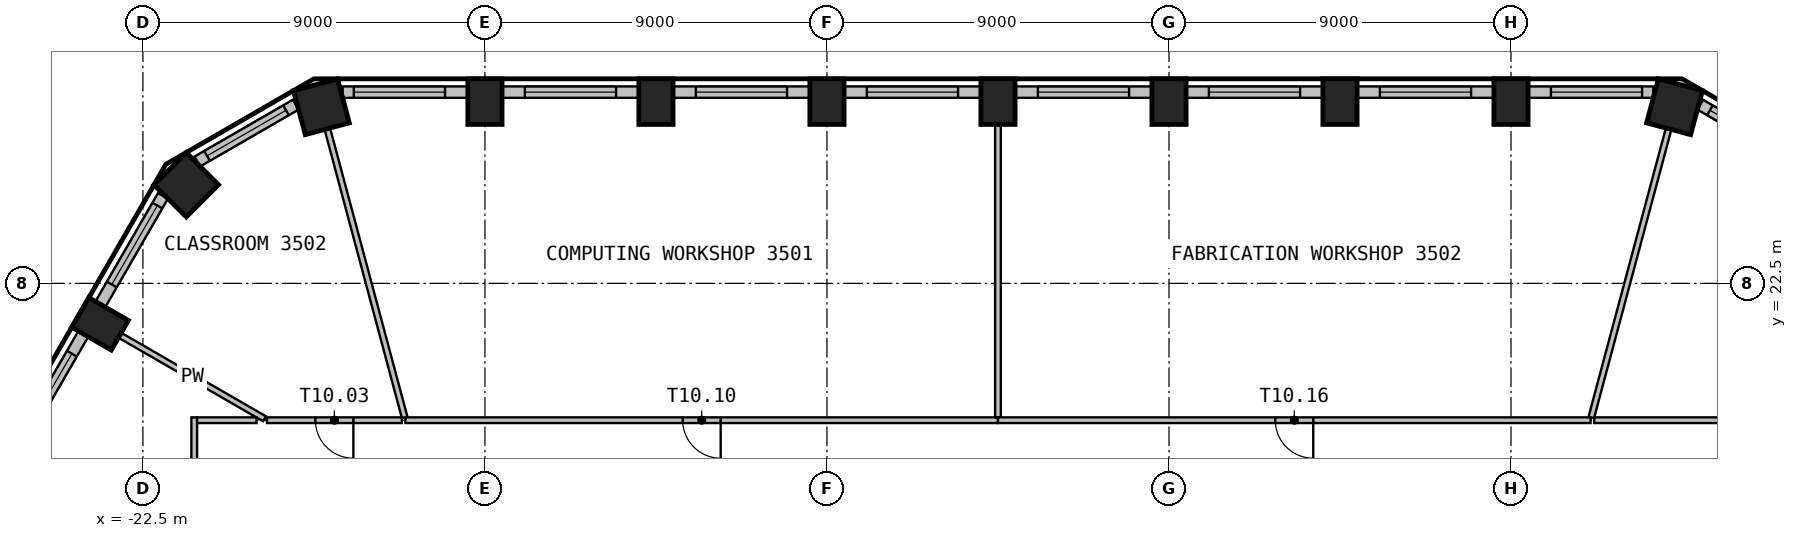
"""IFC4 building model, lengths in metres.
Left out: names, types, materials, properties, quantities, classifications, styles, units other than length and angle.
Written with IfcOpenShell. Run it as: python <this file> out.ifc"""

import sys

from ifc_helpers import new_model, si_unit, direction, frame, frame_2d, origin, origin_2d, place, context, subcontext, project, spatial, rectangle, extrude, element, fill, save


model = new_model("IFC4")
c1 = context("Model", 3, precision=1e-05, world=origin(), true_north=direction((0.0, 1.0)))
c2 = subcontext(c1, "Body", "Model", "MODEL_VIEW")
j1 = project(units=[si_unit("LENGTHUNIT", "METRE"), si_unit("PLANEANGLEUNIT", "RADIAN")], contexts=[c1])
p1 = place(None, origin())
s1 = spatial("IfcSite", under=j1, at=p1, CompositionType="ELEMENT")
p2 = place(p1, origin())
s2 = spatial("IfcBuilding", under=s1, at=p2, CompositionType="ELEMENT")
p3 = place(p2, frame((0.0, 0.0, 144.3)))
s3 = spatial("IfcBuildingStorey", under=s2, at=p3, CompositionType="ELEMENT", Elevation=144.3)
p4 = place(p3, frame((17.803, 27.148, 0.0), z_axis=(0.0, 0.0, 1.0), x_axis=(-0.965925826289, 0.258819045103, 0.0)))
e1 = element("IfcColumn", 1, at=p4, inside=s3, PredefinedType="COLUMN", context=c2, shape_type="SweptSolid", body=[
    extrude(rectangle(XDim=1.2, YDim=1.2, at=origin_2d()), origin(), (0.0, 0.0, 1.0), 3.575),
])
for number, where, z_axis, x_axis in (
    (2, (13.5, 27.283, 0.0), (0.0, 0.0, 1.0), (-1.0, 0.0, 0.0)),
    (3, (9.0, 27.283, 0.0), (0.0, 0.0, 1.0), (-1.0, 0.0, 0.0)),
    (4, (4.5, 27.283, 0.0), (0.0, 0.0, 1.0), (-1.0, 0.0, 0.0)),
    (5, (0.0, 27.283, 0.0), (0.0, 0.0, 1.0), (-1.0, 0.0, 0.0)),
    (6, (-4.5, 27.283, 0.0), (0.0, 0.0, 1.0), (-1.0, 0.0, 0.0)),
    (7, (-9.0, 27.283, 0.0), (0.0, 0.0, 1.0), (-1.0, 0.0, 0.0)),
    (8, (-13.5, 27.283, 0.0), (0.0, 0.0, 1.0), (-1.0, 0.0, 0.0)),
):
    element("IfcColumn", number, at=place(p3, frame(where, z_axis=z_axis, x_axis=x_axis)), inside=s3, PredefinedType="COLUMN", context=c2, shape_type="SweptSolid", body=[
        extrude(rectangle(XDim=0.9, YDim=1.2, at=origin_2d()), origin(), (0.0, 0.0, 1.0), 3.575),
    ])
for number, where, z_axis, x_axis in (
    (9, (-17.803, 27.148, 0.0), (0.0, 0.0, 1.0), (-0.966, -0.259, 0.0)),
    (10, (-21.359, 25.095, 0.0), (0.0, 0.0, 1.0), (-0.707, -0.707, 0.0)),
):
    element("IfcColumn", number, at=place(p3, frame(where, z_axis=z_axis, x_axis=x_axis)), inside=s3, PredefinedType="COLUMN", context=c2, shape_type="SweptSolid", body=[
        extrude(rectangle(XDim=1.2, YDim=1.2, at=origin_2d()), origin(), (0.0, 0.0, 1.0), 3.575),
    ])
p5 = place(p3, frame((-23.627, 21.436, 0.0), z_axis=(0.0, 0.0, 1.0), x_axis=(-0.5, -0.866025403784, 0.0)))
e11 = element("IfcColumn", 11, at=p5, inside=s3, PredefinedType="COLUMN", context=c2, shape_type="SweptSolid", body=[
    extrude(rectangle(XDim=0.9, YDim=1.2, at=origin_2d()), origin(), (0.0, 0.0, 1.0), 3.575),
])
p6 = place(p3, frame((21.068, 25.707, 0.0), z_axis=(0.0, 0.0, 1.0), x_axis=(-0.866012844897, 0.500021752, 0.0)))
e12 = element("IfcWall", 12, at=p6, inside=s3, PredefinedType="SOLIDWALL", context=c2, shape_type="SweptSolid", body=[
    extrude(rectangle(XDim=2.989, YDim=0.3, at=frame_2d((1.495, 0.0))), origin(), (0.0, 0.0, 1.0), 3.575),
])
p7 = place(p6, frame((0.295, 0.0, 0.9)))
e13 = element("IfcOpeningElement", 13, at=p7, cuts=e12, PredefinedType="OPENING", context=c2, shape_type="SweptSolid", body=[
    extrude(rectangle(XDim=2.4, YDim=2.1, at=frame_2d((1.2, 1.05))), frame((0.0, 0.16, 0.0), z_axis=(0.0, -1.0, 0.0), x_axis=(1.0, 0.0, 0.0)), (0.0, 0.0, 1.0), 0.32),
])
p8 = place(p3, frame((17.245, 27.533, 0.0), z_axis=(0.0, 0.0, 1.0), x_axis=(-1.0, 0.0, 0.0)))
e14 = element("IfcWall", 14, at=p8, inside=s3, PredefinedType="SOLIDWALL", context=c2, shape_type="SweptSolid", body=[
    extrude(rectangle(XDim=3.294, YDim=0.3, at=frame_2d((1.647, 0.0))), origin(), (0.0, 0.0, 1.0), 3.575),
])
p9 = place(p8, frame((0.295, 0.0, 0.9)))
e15 = element("IfcOpeningElement", 15, at=p9, cuts=e14, PredefinedType="OPENING", context=c2, shape_type="SweptSolid", body=[
    extrude(rectangle(XDim=2.4, YDim=2.1, at=frame_2d((1.2, 1.05))), frame((0.0, 0.16, 0.0), z_axis=(0.0, -1.0, 0.0), x_axis=(1.0, 0.0, 0.0)), (0.0, 0.0, 1.0), 0.32),
])
p10 = place(p3, frame((13.05, 27.533, 0.0), z_axis=(0.0, 0.0, 1.0), x_axis=(-1.0, 0.0, 0.0)))
e16 = element("IfcWall", 16, at=p10, inside=s3, PredefinedType="SOLIDWALL", context=c2, shape_type="SweptSolid", body=[
    extrude(rectangle(XDim=3.599, YDim=0.3, at=frame_2d((1.8, 0.0))), origin(), (0.0, 0.0, 1.0), 3.575),
])
p11 = place(p10, frame((0.6, 0.0, 0.9)))
e17 = element("IfcOpeningElement", 17, at=p11, cuts=e16, PredefinedType="OPENING", context=c2, shape_type="SweptSolid", body=[
    extrude(rectangle(XDim=2.4, YDim=2.1, at=frame_2d((1.2, 1.05))), frame((0.0, 0.16, 0.0), z_axis=(0.0, -1.0, 0.0), x_axis=(1.0, 0.0, 0.0)), (0.0, 0.0, 1.0), 0.32),
])
p12 = place(p3, frame((8.55, 27.533, 0.0), z_axis=(0.0, 0.0, 1.0), x_axis=(-1.0, 0.0, 0.0)))
e18 = element("IfcWall", 18, at=p12, inside=s3, PredefinedType="SOLIDWALL", context=c2, shape_type="SweptSolid", body=[
    extrude(rectangle(XDim=3.599, YDim=0.3, at=frame_2d((1.8, 0.0))), origin(), (0.0, 0.0, 1.0), 3.575),
])
p13 = place(p12, frame((0.6, 0.0, 0.9)))
e19 = element("IfcOpeningElement", 19, at=p13, cuts=e18, PredefinedType="OPENING", context=c2, shape_type="SweptSolid", body=[
    extrude(rectangle(XDim=2.4, YDim=2.1, at=frame_2d((1.2, 1.05))), frame((0.0, 0.16, 0.0), z_axis=(0.0, -1.0, 0.0), x_axis=(1.0, 0.0, 0.0)), (0.0, 0.0, 1.0), 0.32),
])
p14 = place(p3, frame((4.05, 27.533, 0.0), z_axis=(0.0, 0.0, 1.0), x_axis=(-1.0, 0.0, 0.0)))
e20 = element("IfcWall", 20, at=p14, inside=s3, PredefinedType="SOLIDWALL", context=c2, shape_type="SweptSolid", body=[
    extrude(rectangle(XDim=3.599, YDim=0.3, at=frame_2d((1.8, 0.0))), origin(), (0.0, 0.0, 1.0), 3.575),
])
p15 = place(p14, frame((0.6, 0.0, 0.9)))
e21 = element("IfcOpeningElement", 21, at=p15, cuts=e20, PredefinedType="OPENING", context=c2, shape_type="SweptSolid", body=[
    extrude(rectangle(XDim=2.4, YDim=2.1, at=frame_2d((1.2, 1.05))), frame((0.0, 0.16, 0.0), z_axis=(0.0, -1.0, 0.0), x_axis=(1.0, 0.0, 0.0)), (0.0, 0.0, 1.0), 0.32),
])
p16 = place(p3, frame((-0.45, 27.533, 0.0), z_axis=(0.0, 0.0, 1.0), x_axis=(-1.0, 0.0, 0.0)))
e22 = element("IfcWall", 22, at=p16, inside=s3, PredefinedType="SOLIDWALL", context=c2, shape_type="SweptSolid", body=[
    extrude(rectangle(XDim=3.599, YDim=0.3, at=frame_2d((1.8, 0.0))), origin(), (0.0, 0.0, 1.0), 3.575),
])
p17 = place(p16, frame((0.6, 0.0, 0.9)))
e23 = element("IfcOpeningElement", 23, at=p17, cuts=e22, PredefinedType="OPENING", context=c2, shape_type="SweptSolid", body=[
    extrude(rectangle(XDim=2.4, YDim=2.1, at=frame_2d((1.2, 1.05))), frame((0.0, 0.16, 0.0), z_axis=(0.0, -1.0, 0.0), x_axis=(1.0, 0.0, 0.0)), (0.0, 0.0, 1.0), 0.32),
])
p18 = place(p3, frame((-4.95, 27.533, 0.0), z_axis=(0.0, 0.0, 1.0), x_axis=(-1.0, 0.0, 0.0)))
e24 = element("IfcWall", 24, at=p18, inside=s3, PredefinedType="SOLIDWALL", context=c2, shape_type="SweptSolid", body=[
    extrude(rectangle(XDim=3.599, YDim=0.3, at=frame_2d((1.8, 0.0))), origin(), (0.0, 0.0, 1.0), 3.575),
])
p19 = place(p18, frame((0.6, 0.0, 0.9)))
e25 = element("IfcOpeningElement", 25, at=p19, cuts=e24, PredefinedType="OPENING", context=c2, shape_type="SweptSolid", body=[
    extrude(rectangle(XDim=2.4, YDim=2.1, at=frame_2d((1.2, 1.05))), frame((0.0, 0.16, 0.0), z_axis=(0.0, -1.0, 0.0), x_axis=(1.0, 0.0, 0.0)), (0.0, 0.0, 1.0), 0.32),
])
p20 = place(p3, frame((-9.45, 27.533, 0.0), z_axis=(0.0, 0.0, 1.0), x_axis=(-1.0, 0.0, 0.0)))
e26 = element("IfcWall", 26, at=p20, inside=s3, PredefinedType="SOLIDWALL", context=c2, shape_type="SweptSolid", body=[
    extrude(rectangle(XDim=3.599, YDim=0.3, at=frame_2d((1.8, 0.0))), origin(), (0.0, 0.0, 1.0), 3.575),
])
p21 = place(p20, frame((0.6, 0.0, 0.9)))
e27 = element("IfcOpeningElement", 27, at=p21, cuts=e26, PredefinedType="OPENING", context=c2, shape_type="SweptSolid", body=[
    extrude(rectangle(XDim=2.4, YDim=2.1, at=frame_2d((1.2, 1.05))), frame((0.0, 0.16, 0.0), z_axis=(0.0, -1.0, 0.0), x_axis=(1.0, 0.0, 0.0)), (0.0, 0.0, 1.0), 0.32),
])
p22 = place(p3, frame((-13.95, 27.533, 0.0), z_axis=(0.0, 0.0, 1.0), x_axis=(-1.0, 0.0, 0.0)))
e28 = element("IfcWall", 28, at=p22, inside=s3, PredefinedType="SOLIDWALL", context=c2, shape_type="SweptSolid", body=[
    extrude(rectangle(XDim=3.294, YDim=0.3, at=frame_2d((1.647, 0.0))), origin(), (0.0, 0.0, 1.0), 3.575),
])
p23 = place(p22, frame((0.6, 0.0, 0.9)))
e29 = element("IfcOpeningElement", 29, at=p23, cuts=e28, PredefinedType="OPENING", context=c2, shape_type="SweptSolid", body=[
    extrude(rectangle(XDim=2.4, YDim=2.1, at=frame_2d((1.2, 1.05))), frame((0.0, 0.16, 0.0), z_axis=(0.0, -1.0, 0.0), x_axis=(1.0, 0.0, 0.0)), (0.0, 0.0, 1.0), 0.32),
])
p24 = place(p3, frame((-18.479, 27.202, 0.0), z_axis=(0.0, 0.0, 1.0), x_axis=(-0.866012844897, -0.500021752, 0.0)))
e30 = element("IfcWall", 30, at=p24, inside=s3, PredefinedType="SOLIDWALL", context=c2, shape_type="SweptSolid", body=[
    extrude(rectangle(XDim=2.989, YDim=0.3, at=frame_2d((1.495, 0.0))), origin(), (0.0, 0.0, 1.0), 3.575),
])
p25 = place(p24, frame((0.295, 0.0, 0.9)))
e31 = element("IfcOpeningElement", 31, at=p25, cuts=e30, PredefinedType="OPENING", context=c2, shape_type="SweptSolid", body=[
    extrude(rectangle(XDim=2.4, YDim=2.1, at=frame_2d((1.2, 1.05))), frame((0.0, 0.16, 0.0), z_axis=(0.0, -1.0, 0.0), x_axis=(1.0, 0.0, 0.0)), (0.0, 0.0, 1.0), 0.32),
])
p26 = place(p3, frame((-21.972, 24.803, 0.0), z_axis=(0.0, 0.0, 1.0), x_axis=(-0.500036802197, -0.866004154983, 0.0)))
e32 = element("IfcWall", 32, at=p26, inside=s3, PredefinedType="SOLIDWALL", context=c2, shape_type="SweptSolid", body=[
    extrude(rectangle(XDim=3.294, YDim=0.3, at=frame_2d((1.647, 0.0))), origin(), (0.0, 0.0, 1.0), 3.575),
])
p27 = place(p26, frame((0.294, 0.0, 0.9)))
e33 = element("IfcOpeningElement", 33, at=p27, cuts=e32, PredefinedType="OPENING", context=c2, shape_type="SweptSolid", body=[
    extrude(rectangle(XDim=2.4, YDim=2.1, at=frame_2d((1.2, 1.05))), frame((0.0, 0.16, 0.0), z_axis=(0.0, -1.0, 0.0), x_axis=(1.0, 0.0, 0.0)), (0.0, 0.0, 1.0), 0.32),
])
p28 = place(p3, frame((-24.069, 21.17, 0.0), z_axis=(0.0, 0.0, 1.0), x_axis=(-0.500027802648, -0.866009351323, 0.0)))
e34 = element("IfcWall", 34, at=p28, inside=s3, PredefinedType="SOLIDWALL", context=c2, shape_type="SweptSolid", body=[
    extrude(rectangle(XDim=3.599, YDim=0.3, at=frame_2d((1.799, 0.0))), origin(), (0.0, 0.0, 1.0), 3.575),
])
p29 = place(p28, frame((0.6, 0.0, 0.9)))
e35 = element("IfcOpeningElement", 35, at=p29, cuts=e34, PredefinedType="OPENING", context=c2, shape_type="SweptSolid", body=[
    extrude(rectangle(XDim=2.4, YDim=2.1, at=frame_2d((1.2, 1.05))), frame((0.0, 0.16, 0.0), z_axis=(0.0, -1.0, 0.0), x_axis=(1.0, 0.0, 0.0)), (0.0, 0.0, 1.0), 0.32),
])
p30 = place(p3, frame((-23.09, 21.126, 0.0), z_axis=(0.0, 0.0, 1.0), x_axis=(0.865968165673, -0.500099126214, 0.0)))
e36 = element("IfcWall", 36, at=p30, inside=s3, PredefinedType="PARTITIONING", context=c2, shape_type="SweptSolid", body=[
    extrude(rectangle(XDim=4.376, YDim=0.15, at=frame_2d((2.188, 0.0))), origin(), (0.0, 0.0, 1.0), 3.575),
])
p31 = place(p3, frame((-21.15, 18.975, 0.0), z_axis=(0.0, 0.0, 1.0), x_axis=(0.0, -1.0, 0.0)))
e37 = element("IfcWall", 37, at=p31, inside=s3, PredefinedType="PARTITIONING", context=c2, shape_type="SweptSolid", body=[
    extrude(rectangle(XDim=16.65, YDim=0.15, at=frame_2d((8.325, 0.0))), origin(), (0.0, 0.0, 1.0), 3.575),
])
p32 = place(p31, frame((7.825, 0.0, 0.0)))
e38 = element("IfcOpeningElement", 38, at=p32, cuts=e37, PredefinedType="OPENING", context=c2, shape_type="SweptSolid", body=[
    extrude(rectangle(XDim=1.0, YDim=2.1, at=frame_2d((0.5, 1.05))), frame((0.0, 0.085, 0.0), z_axis=(0.0, -1.0, 0.0), x_axis=(1.0, 0.0, 0.0)), (0.0, 0.0, 1.0), 0.17),
])
p33 = place(p3, frame((-19.511, 18.9, 0.0), z_axis=(0.0, 0.0, 1.0), x_axis=(-1.0, 0.0, 0.0)))
e39 = element("IfcWall", 39, at=p33, inside=s3, PredefinedType="PARTITIONING", context=c2, shape_type="SweptSolid", body=[
    extrude(rectangle(XDim=1.564, YDim=0.15, at=frame_2d((0.782, 0.0))), origin(), (0.0, 0.0, 1.0), 3.575),
])
p34 = place(p3, frame((-15.688, 18.9, 0.0), z_axis=(0.0, 0.0, 1.0), x_axis=(-1.0, 0.0, 0.0)))
e40 = element("IfcWall", 40, at=p34, inside=s3, PredefinedType="PARTITIONING", context=c2, shape_type="SweptSolid", body=[
    extrude(rectangle(XDim=3.548, YDim=0.15, at=frame_2d((1.774, 0.0))), origin(), (0.0, 0.0, 1.0), 3.575),
])
p35 = place(p34, frame((1.274, 0.0, 0.0)))
e41 = element("IfcOpeningElement", 41, at=p35, cuts=e40, PredefinedType="OPENING", context=c2, shape_type="SweptSolid", body=[
    extrude(rectangle(XDim=1.0, YDim=2.1, at=frame_2d((0.5, 1.05))), frame((0.0, 0.085, 0.0), z_axis=(0.0, -1.0, 0.0), x_axis=(1.0, 0.0, 0.0)), (0.0, 0.0, 1.0), 0.17),
])
p36 = place(p3, frame((-17.643, 26.549, 0.0), z_axis=(0.0, 0.0, 1.0), x_axis=(0.258869363255, -0.965912342176, 0.0)))
e42 = element("IfcWall", 42, at=p36, inside=s3, PredefinedType="PARTITIONING", context=c2, shape_type="SweptSolid", body=[
    extrude(rectangle(XDim=7.844, YDim=0.15, at=frame_2d((3.922, 0.0))), origin(), (0.0, 0.0, 1.0), 3.575),
])
p37 = place(p3, frame((0.0, 18.9, 0.0), z_axis=(0.0, 0.0, 1.0), x_axis=(-1.0, 0.0, 0.0)))
e43 = element("IfcWall", 43, at=p37, inside=s3, PredefinedType="PARTITIONING", context=c2, shape_type="SweptSolid", body=[
    extrude(rectangle(XDim=15.593, YDim=0.15, at=frame_2d((7.796, 0.0))), origin(), (0.0, 0.0, 1.0), 3.575),
])
p38 = place(p37, frame((7.296, 0.0, 0.0)))
e44 = element("IfcOpeningElement", 44, at=p38, cuts=e43, PredefinedType="OPENING", context=c2, shape_type="SweptSolid", body=[
    extrude(rectangle(XDim=1.0, YDim=2.1, at=frame_2d((0.5, 1.05))), frame((0.0, 0.085, 0.0), z_axis=(0.0, -1.0, 0.0), x_axis=(1.0, 0.0, 0.0)), (0.0, 0.0, 1.0), 0.17),
])
p39 = place(p3, frame((0.0, 26.663, 0.0), z_axis=(0.0, 0.0, 1.0), x_axis=(0.0, -1.0, 0.0)))
e45 = element("IfcWall", 45, at=p39, inside=s3, PredefinedType="PARTITIONING", context=c2, shape_type="SweptSolid", body=[
    extrude(rectangle(XDim=7.688, YDim=0.15, at=frame_2d((3.844, 0.0))), origin(), (0.0, 0.0, 1.0), 3.575),
])
p40 = place(p3, frame((15.593, 18.9, 0.0), z_axis=(0.0, 0.0, 1.0), x_axis=(-1.0, 0.0, 0.0)))
e46 = element("IfcWall", 46, at=p40, inside=s3, PredefinedType="PARTITIONING", context=c2, shape_type="SweptSolid", body=[
    extrude(rectangle(XDim=15.593, YDim=0.15, at=frame_2d((7.796, 0.0))), origin(), (0.0, 0.0, 1.0), 3.575),
])
p41 = place(p40, frame((7.296, 0.0, 0.0)))
e47 = element("IfcOpeningElement", 47, at=p41, cuts=e46, PredefinedType="OPENING", context=c2, shape_type="SweptSolid", body=[
    extrude(rectangle(XDim=1.0, YDim=2.1, at=frame_2d((0.5, 1.05))), frame((0.0, 0.085, 0.0), z_axis=(0.0, -1.0, 0.0), x_axis=(1.0, 0.0, 0.0)), (0.0, 0.0, 1.0), 0.17),
])
p42 = place(p3, frame((17.643, 26.549, 0.0), z_axis=(0.0, 0.0, 1.0), x_axis=(-0.258869363255, -0.965912342176, 0.0)))
e48 = element("IfcWall", 48, at=p42, inside=s3, PredefinedType="PARTITIONING", context=c2, shape_type="SweptSolid", body=[
    extrude(rectangle(XDim=7.844, YDim=0.15, at=frame_2d((3.922, 0.0))), origin(), (0.0, 0.0, 1.0), 3.575),
])
p43 = place(p3, frame((21.225, 18.9, 0.0), z_axis=(0.0, 0.0, 1.0), x_axis=(-1.0, 0.0, 0.0)))
e49 = element("IfcWall", 49, at=p43, inside=s3, PredefinedType="PARTITIONING", context=c2, shape_type="SweptSolid", body=[
    extrude(rectangle(XDim=5.537, YDim=0.15, at=frame_2d((2.769, 0.0))), origin(), (0.0, 0.0, 1.0), 3.575),
])
p44 = place(p7, origin())
e50 = element("IfcWindow", 50, at=p44, inside=s3, PartitioningType="SINGLE_PANEL", PredefinedType="WINDOW", context=c2, shape_type="SweptSolid", body=[
    extrude(rectangle(XDim=2.4, YDim=2.1, at=frame_2d((1.2, 1.05))), frame((0.0, 0.03, 0.0), z_axis=(0.0, -1.0, 0.0), x_axis=(1.0, 0.0, 0.0)), (0.0, 0.0, 1.0), 0.06),
])
fill(e13, e50)
p45 = place(p9, origin())
e51 = element("IfcWindow", 51, at=p45, inside=s3, PartitioningType="SINGLE_PANEL", PredefinedType="WINDOW", context=c2, shape_type="SweptSolid", body=[
    extrude(rectangle(XDim=2.4, YDim=2.1, at=frame_2d((1.2, 1.05))), frame((0.0, 0.03, 0.0), z_axis=(0.0, -1.0, 0.0), x_axis=(1.0, 0.0, 0.0)), (0.0, 0.0, 1.0), 0.06),
])
fill(e15, e51)
p46 = place(p11, origin())
e52 = element("IfcWindow", 52, at=p46, inside=s3, PartitioningType="SINGLE_PANEL", PredefinedType="WINDOW", context=c2, shape_type="SweptSolid", body=[
    extrude(rectangle(XDim=2.4, YDim=2.1, at=frame_2d((1.2, 1.05))), frame((0.0, 0.03, 0.0), z_axis=(0.0, -1.0, 0.0), x_axis=(1.0, 0.0, 0.0)), (0.0, 0.0, 1.0), 0.06),
])
fill(e17, e52)
p47 = place(p13, origin())
e53 = element("IfcWindow", 53, at=p47, inside=s3, PartitioningType="SINGLE_PANEL", PredefinedType="WINDOW", context=c2, shape_type="SweptSolid", body=[
    extrude(rectangle(XDim=2.4, YDim=2.1, at=frame_2d((1.2, 1.05))), frame((0.0, 0.03, 0.0), z_axis=(0.0, -1.0, 0.0), x_axis=(1.0, 0.0, 0.0)), (0.0, 0.0, 1.0), 0.06),
])
fill(e19, e53)
p48 = place(p15, origin())
e54 = element("IfcWindow", 54, at=p48, inside=s3, PartitioningType="SINGLE_PANEL", PredefinedType="WINDOW", context=c2, shape_type="SweptSolid", body=[
    extrude(rectangle(XDim=2.4, YDim=2.1, at=frame_2d((1.2, 1.05))), frame((0.0, 0.03, 0.0), z_axis=(0.0, -1.0, 0.0), x_axis=(1.0, 0.0, 0.0)), (0.0, 0.0, 1.0), 0.06),
])
fill(e21, e54)
p49 = place(p17, origin())
e55 = element("IfcWindow", 55, at=p49, inside=s3, PartitioningType="SINGLE_PANEL", PredefinedType="WINDOW", context=c2, shape_type="SweptSolid", body=[
    extrude(rectangle(XDim=2.4, YDim=2.1, at=frame_2d((1.2, 1.05))), frame((0.0, 0.03, 0.0), z_axis=(0.0, -1.0, 0.0), x_axis=(1.0, 0.0, 0.0)), (0.0, 0.0, 1.0), 0.06),
])
fill(e23, e55)
p50 = place(p19, origin())
e56 = element("IfcWindow", 56, at=p50, inside=s3, PartitioningType="SINGLE_PANEL", PredefinedType="WINDOW", context=c2, shape_type="SweptSolid", body=[
    extrude(rectangle(XDim=2.4, YDim=2.1, at=frame_2d((1.2, 1.05))), frame((0.0, 0.03, 0.0), z_axis=(0.0, -1.0, 0.0), x_axis=(1.0, 0.0, 0.0)), (0.0, 0.0, 1.0), 0.06),
])
fill(e25, e56)
p51 = place(p21, origin())
e57 = element("IfcWindow", 57, at=p51, inside=s3, PartitioningType="SINGLE_PANEL", PredefinedType="WINDOW", context=c2, shape_type="SweptSolid", body=[
    extrude(rectangle(XDim=2.4, YDim=2.1, at=frame_2d((1.2, 1.05))), frame((0.0, 0.03, 0.0), z_axis=(0.0, -1.0, 0.0), x_axis=(1.0, 0.0, 0.0)), (0.0, 0.0, 1.0), 0.06),
])
fill(e27, e57)
p52 = place(p23, origin())
e58 = element("IfcWindow", 58, at=p52, inside=s3, PartitioningType="SINGLE_PANEL", PredefinedType="WINDOW", context=c2, shape_type="SweptSolid", body=[
    extrude(rectangle(XDim=2.4, YDim=2.1, at=frame_2d((1.2, 1.05))), frame((0.0, 0.03, 0.0), z_axis=(0.0, -1.0, 0.0), x_axis=(1.0, 0.0, 0.0)), (0.0, 0.0, 1.0), 0.06),
])
fill(e29, e58)
p53 = place(p25, origin())
e59 = element("IfcWindow", 59, at=p53, inside=s3, PartitioningType="SINGLE_PANEL", PredefinedType="WINDOW", context=c2, shape_type="SweptSolid", body=[
    extrude(rectangle(XDim=2.4, YDim=2.1, at=frame_2d((1.2, 1.05))), frame((0.0, 0.03, 0.0), z_axis=(0.0, -1.0, 0.0), x_axis=(1.0, 0.0, 0.0)), (0.0, 0.0, 1.0), 0.06),
])
fill(e31, e59)
p54 = place(p27, origin())
e60 = element("IfcWindow", 60, at=p54, inside=s3, PartitioningType="SINGLE_PANEL", PredefinedType="WINDOW", context=c2, shape_type="SweptSolid", body=[
    extrude(rectangle(XDim=2.4, YDim=2.1, at=frame_2d((1.2, 1.05))), frame((0.0, 0.03, 0.0), z_axis=(0.0, -1.0, 0.0), x_axis=(1.0, 0.0, 0.0)), (0.0, 0.0, 1.0), 0.06),
])
fill(e33, e60)
p55 = place(p29, origin())
e61 = element("IfcWindow", 61, at=p55, inside=s3, PartitioningType="SINGLE_PANEL", PredefinedType="WINDOW", context=c2, shape_type="SweptSolid", body=[
    extrude(rectangle(XDim=2.4, YDim=2.1, at=frame_2d((1.2, 1.05))), frame((0.0, 0.03, 0.0), z_axis=(0.0, -1.0, 0.0), x_axis=(1.0, 0.0, 0.0)), (0.0, 0.0, 1.0), 0.06),
])
fill(e35, e61)
p56 = place(p35, origin())
e62 = element("IfcDoor", 62, at=p56, inside=s3, OperationType="SINGLE_SWING_RIGHT", PredefinedType="DOOR", context=c2, shape_type="SweptSolid", body=[
    extrude(rectangle(XDim=1.0, YDim=2.1, at=frame_2d((0.5, 1.05))), frame((0.0, 0.025, 0.0), z_axis=(0.0, -1.0, 0.0), x_axis=(1.0, 0.0, 0.0)), (0.0, 0.0, 1.0), 0.05),
])
fill(e41, e62)
p57 = place(p38, origin())
e63 = element("IfcDoor", 63, at=p57, inside=s3, OperationType="SINGLE_SWING_LEFT", PredefinedType="DOOR", context=c2, shape_type="SweptSolid", body=[
    extrude(rectangle(XDim=1.0, YDim=2.1, at=frame_2d((0.5, 1.05))), frame((0.0, 0.025, 0.0), z_axis=(0.0, -1.0, 0.0), x_axis=(1.0, 0.0, 0.0)), (0.0, 0.0, 1.0), 0.05),
])
fill(e44, e63)
p58 = place(p41, origin())
e64 = element("IfcDoor", 64, at=p58, inside=s3, OperationType="SINGLE_SWING_RIGHT", PredefinedType="DOOR", context=c2, shape_type="SweptSolid", body=[
    extrude(rectangle(XDim=1.0, YDim=2.1, at=frame_2d((0.5, 1.05))), frame((0.0, 0.025, 0.0), z_axis=(0.0, -1.0, 0.0), x_axis=(1.0, 0.0, 0.0)), (0.0, 0.0, 1.0), 0.05),
])
fill(e47, e64)
save(model, sys.argv[1])
